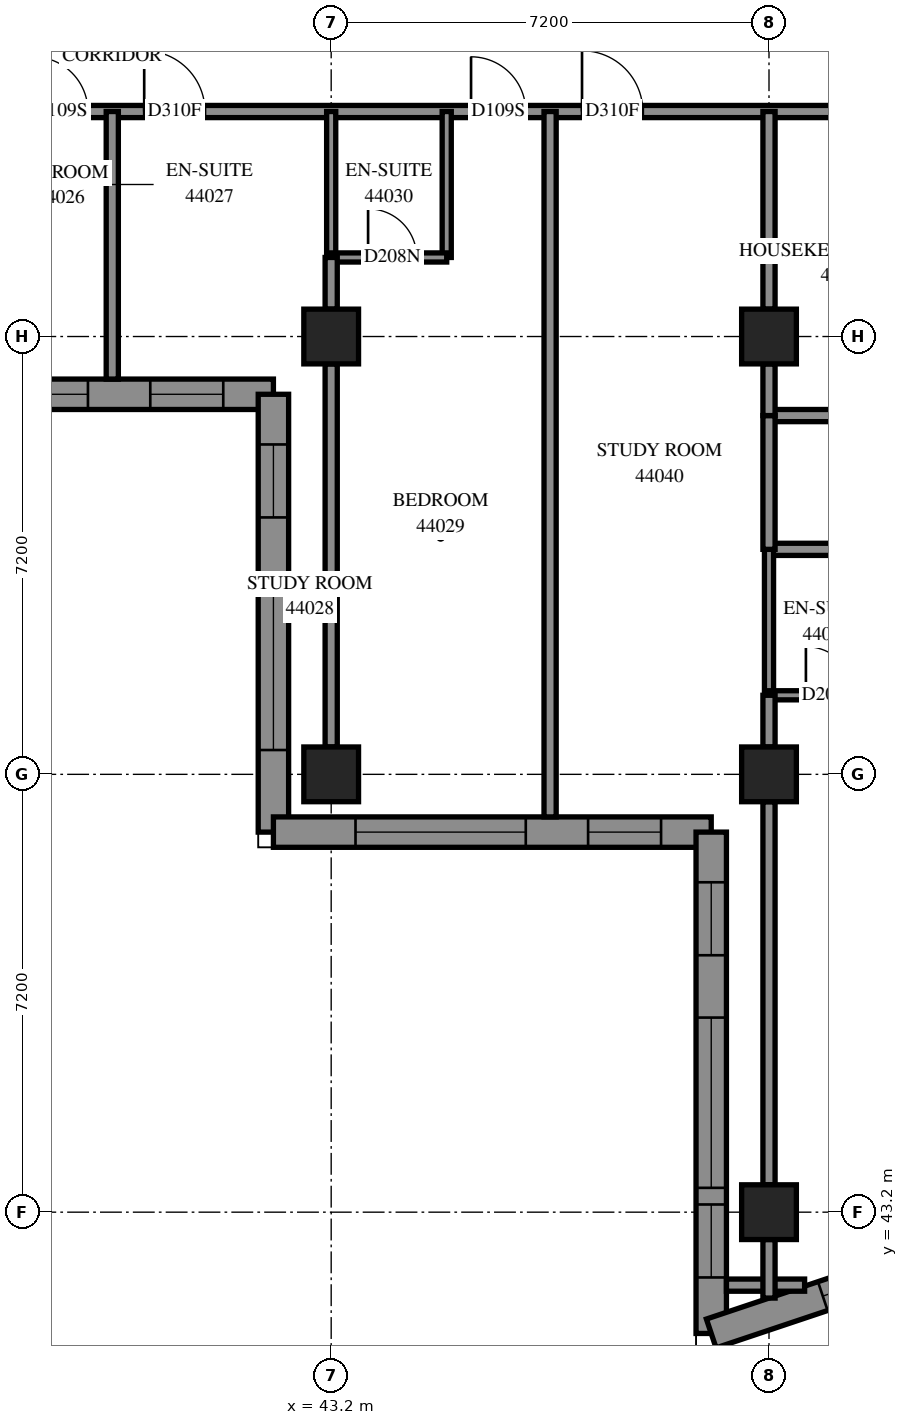
"""IFC4 building model, lengths in metres.
Left out: names, types, materials, properties, quantities, classifications, styles, units other than length and angle.
Written with IfcOpenShell. Run it as: python <this file> out.ifc"""

import sys

from ifc_helpers import new_model, si_unit, direction, frame, frame_2d, origin, origin_2d, place, context, subcontext, project, spatial, polyline, rectangle, outline, extrude, element, fill, save


model = new_model("IFC4")
c1 = context("Model", 3, precision=1e-05, world=origin(), true_north=direction((0.0, 1.0)))
c2 = subcontext(c1, "Body", "Model", "MODEL_VIEW")
j1 = project(units=[si_unit("LENGTHUNIT", "METRE"), si_unit("PLANEANGLEUNIT", "RADIAN")], contexts=[c1])
p1 = place(None, origin())
s1 = spatial("IfcSite", under=j1, at=p1, CompositionType="ELEMENT")
p2 = place(p1, origin())
s2 = spatial("IfcBuilding", under=s1, at=p2, CompositionType="ELEMENT")
p3 = place(p2, frame((0.0, 0.0, 162.6)))
s3 = spatial("IfcBuildingStorey", under=s2, at=p3, CompositionType="ELEMENT", Elevation=162.6)
for number, where, z_axis, x_axis in (
    (1, (43.2, 50.4, 0.0), (0.0, 0.0, 1.0), (1.0, 0.0, 0.0)),
    (2, (43.2, 57.6, 0.0), (0.0, 0.0, 1.0), (1.0, 0.0, 0.0)),
    (3, (50.4, 43.2, 0.0), (0.0, 0.0, 1.0), (1.0, 0.0, 0.0)),
    (4, (50.4, 50.4, 0.0), (0.0, 0.0, 1.0), (1.0, 0.0, 0.0)),
    (5, (50.4, 57.6, 0.0), (0.0, 0.0, 1.0), (1.0, 0.0, 0.0)),
):
    element("IfcColumn", number, at=place(p3, frame(where, z_axis=z_axis, x_axis=x_axis)), inside=s3, PredefinedType="COLUMN", context=c2, shape_type="SweptSolid", body=[
        extrude(rectangle(XDim=0.9, YDim=0.9, at=origin_2d()), origin(), (0.0, 0.0, 1.0), 3.1),
    ])
p4 = place(p3, frame((35.05, 56.65, 0.0), z_axis=(0.0, 0.0, 1.0), x_axis=(1.0, 0.0, 0.0)))
e6 = element("IfcWall", 6, at=p4, inside=s3, PredefinedType="SOLIDWALL", context=c2, shape_type="SweptSolid", body=[
    extrude(outline(polyline([(-0.25, -0.25), (6.95, -0.25), (7.45, 0.25), (0.25, 0.25), (-0.25, -0.25)])), origin(), (0.0, 0.0, 1.0), 3.1),
])
p5 = place(p4, frame((1.35, 0.0, 0.45)))
e7 = element("IfcOpeningElement", 7, at=p5, cuts=e6, PredefinedType="OPENING", context=c2, shape_type="SweptSolid", body=[
    extrude(rectangle(XDim=2.8, YDim=2.5, at=frame_2d((1.4, 1.25))), frame((0.0, 0.26, 0.0), z_axis=(0.0, -1.0, 0.0), x_axis=(1.0, 0.0, 0.0)), (0.0, 0.0, 1.0), 0.52),
])
p6 = place(p4, frame((5.175, 0.0, 0.45)))
e8 = element("IfcOpeningElement", 8, at=p6, cuts=e6, PredefinedType="OPENING", context=c2, shape_type="SweptSolid", body=[
    extrude(rectangle(XDim=1.2, YDim=2.5, at=frame_2d((0.6, 1.25))), frame((0.0, 0.26, 0.0), z_axis=(0.0, -1.0, 0.0), x_axis=(1.0, 0.0, 0.0)), (0.0, 0.0, 1.0), 0.52),
])
p7 = place(p3, frame((42.25, 56.65, 0.0), z_axis=(0.0, 0.0, 1.0), x_axis=(0.0, -1.0, 0.0)))
e9 = element("IfcWall", 9, at=p7, inside=s3, PredefinedType="SOLIDWALL", context=c2, shape_type="SweptSolid", body=[
    extrude(outline(polyline([(0.25, -0.25), (7.45, -0.25), (6.95, 0.25), (-0.25, 0.25), (0.25, -0.25)])), origin(), (0.0, 0.0, 1.0), 3.1),
])
p8 = place(p7, frame((3.05, 0.0, 0.45)))
e10 = element("IfcOpeningElement", 10, at=p8, cuts=e9, PredefinedType="OPENING", context=c2, shape_type="SweptSolid", body=[
    extrude(rectangle(XDim=2.8, YDim=2.5, at=frame_2d((1.4, 1.25))), frame((0.0, 0.26, 0.0), z_axis=(0.0, -1.0, 0.0), x_axis=(1.0, 0.0, 0.0)), (0.0, 0.0, 1.0), 0.52),
])
p9 = place(p7, frame((0.825, 0.0, 0.45)))
e11 = element("IfcOpeningElement", 11, at=p9, cuts=e9, PredefinedType="OPENING", context=c2, shape_type="SweptSolid", body=[
    extrude(rectangle(XDim=1.2, YDim=2.5, at=frame_2d((0.6, 1.25))), frame((0.0, 0.26, 0.0), z_axis=(0.0, -1.0, 0.0), x_axis=(1.0, 0.0, 0.0)), (0.0, 0.0, 1.0), 0.52),
])
p10 = place(p3, frame((42.25, 49.45, 0.0), z_axis=(0.0, 0.0, 1.0), x_axis=(1.0, 0.0, 0.0)))
e12 = element("IfcWall", 12, at=p10, inside=s3, PredefinedType="SOLIDWALL", context=c2, shape_type="SweptSolid", body=[
    extrude(outline(polyline([(-0.25, -0.25), (6.95, -0.25), (7.45, 0.25), (0.25, 0.25), (-0.25, -0.25)])), origin(), (0.0, 0.0, 1.0), 3.1),
])
p11 = place(p10, frame((1.35, 0.0, 0.45)))
e13 = element("IfcOpeningElement", 13, at=p11, cuts=e12, PredefinedType="OPENING", context=c2, shape_type="SweptSolid", body=[
    extrude(rectangle(XDim=2.8, YDim=2.5, at=frame_2d((1.4, 1.25))), frame((0.0, 0.26, 0.0), z_axis=(0.0, -1.0, 0.0), x_axis=(1.0, 0.0, 0.0)), (0.0, 0.0, 1.0), 0.52),
])
p12 = place(p10, frame((5.175, 0.0, 0.45)))
e14 = element("IfcOpeningElement", 14, at=p12, cuts=e12, PredefinedType="OPENING", context=c2, shape_type="SweptSolid", body=[
    extrude(rectangle(XDim=1.2, YDim=2.5, at=frame_2d((0.6, 1.25))), frame((0.0, 0.26, 0.0), z_axis=(0.0, -1.0, 0.0), x_axis=(1.0, 0.0, 0.0)), (0.0, 0.0, 1.0), 0.52),
])
p13 = place(p3, frame((49.45, 49.45, 0.0), z_axis=(0.0, 0.0, 1.0), x_axis=(0.0, -1.0, 0.0)))
e15 = element("IfcWall", 15, at=p13, inside=s3, PredefinedType="SOLIDWALL", context=c2, shape_type="SweptSolid", body=[
    extrude(outline(polyline([(0.25, -0.25), (8.592, -0.25), (7.897, 0.25), (-0.25, 0.25), (0.25, -0.25)])), origin(), (0.0, 0.0, 1.0), 3.1),
])
p14 = place(p13, frame((3.05, 0.0, 0.45)))
e16 = element("IfcOpeningElement", 16, at=p14, cuts=e15, PredefinedType="OPENING", context=c2, shape_type="SweptSolid", body=[
    extrude(rectangle(XDim=2.8, YDim=2.5, at=frame_2d((1.4, 1.25))), frame((0.0, 0.26, 0.0), z_axis=(0.0, -1.0, 0.0), x_axis=(1.0, 0.0, 0.0)), (0.0, 0.0, 1.0), 0.52),
])
p15 = place(p13, frame((0.825, 0.0, 0.45)))
e17 = element("IfcOpeningElement", 17, at=p15, cuts=e15, PredefinedType="OPENING", context=c2, shape_type="SweptSolid", body=[
    extrude(rectangle(XDim=1.2, YDim=2.5, at=frame_2d((0.6, 1.25))), frame((0.0, 0.26, 0.0), z_axis=(0.0, -1.0, 0.0), x_axis=(1.0, 0.0, 0.0)), (0.0, 0.0, 1.0), 0.52),
])
p16 = place(p13, frame((6.124, 0.0, 0.45)))
e18 = element("IfcOpeningElement", 18, at=p16, cuts=e15, PredefinedType="OPENING", context=c2, shape_type="SweptSolid", body=[
    extrude(rectangle(XDim=1.2, YDim=2.5, at=frame_2d((0.6, 1.25))), frame((0.0, 0.26, 0.0), z_axis=(0.0, -1.0, 0.0), x_axis=(1.0, 0.0, 0.0)), (0.0, 0.0, 1.0), 0.52),
])
p17 = place(p3, frame((49.45, 41.205, 0.0), z_axis=(0.0, 0.0, 1.0), x_axis=(0.9482534743, 0.3175143279, 0.0)))
e19 = element("IfcWall", 19, at=p17, inside=s3, PredefinedType="SOLIDWALL", context=c2, shape_type="SweptSolid", body=[
    extrude(outline(polyline([(-0.347, -0.25), (3.249, -0.25), (3.372, 0.25), (0.347, 0.25), (-0.347, -0.25)])), origin(), (0.0, 0.0, 1.0), 3.1),
])
p18 = place(p17, frame((1.935, 0.0, 0.45)))
e20 = element("IfcOpeningElement", 20, at=p18, cuts=e19, PredefinedType="OPENING", context=c2, shape_type="SweptSolid", body=[
    extrude(rectangle(XDim=1.0, YDim=2.5, at=frame_2d((0.5, 1.25))), frame((0.0, 0.26, 0.0), z_axis=(0.0, -1.0, 0.0), x_axis=(1.0, 0.0, 0.0)), (0.0, 0.0, 1.0), 0.52),
])
p19 = place(p3, frame((36.0, 61.3, 0.0), z_axis=(0.0, 0.0, 1.0), x_axis=(1.0, 0.0, 0.0)))
e21 = element("IfcWall", 21, at=p19, inside=s3, PredefinedType="PARTITIONING", context=c2, shape_type="SweptSolid", body=[
    extrude(rectangle(XDim=16.9, YDim=0.2, at=frame_2d((8.45, 0.0))), origin(), (0.0, 0.0, 1.0), 3.1),
])
p20 = place(p19, frame((2.3, 0.0, 0.0)))
e22 = element("IfcOpeningElement", 22, at=p20, cuts=e21, PredefinedType="OPENING", context=c2, shape_type="SweptSolid", body=[
    extrude(rectangle(XDim=0.9, YDim=2.1, at=frame_2d((0.45, 1.05))), frame((0.0, 0.11, 0.0), z_axis=(0.0, -1.0, 0.0), x_axis=(1.0, 0.0, 0.0)), (0.0, 0.0, 1.0), 0.22),
])
p21 = place(p19, frame((4.125, 0.0, 0.0)))
e23 = element("IfcOpeningElement", 23, at=p21, cuts=e21, PredefinedType="OPENING", context=c2, shape_type="SweptSolid", body=[
    extrude(rectangle(XDim=1.0, YDim=2.1, at=frame_2d((0.5, 1.05))), frame((0.0, 0.11, 0.0), z_axis=(0.0, -1.0, 0.0), x_axis=(1.0, 0.0, 0.0)), (0.0, 0.0, 1.0), 0.22),
])
p22 = place(p19, frame((9.5, 0.0, 0.0)))
e24 = element("IfcOpeningElement", 24, at=p22, cuts=e21, PredefinedType="OPENING", context=c2, shape_type="SweptSolid", body=[
    extrude(rectangle(XDim=0.9, YDim=2.1, at=frame_2d((0.45, 1.05))), frame((0.0, 0.11, 0.0), z_axis=(0.0, -1.0, 0.0), x_axis=(1.0, 0.0, 0.0)), (0.0, 0.0, 1.0), 0.22),
])
p23 = place(p19, frame((11.325, 0.0, 0.0)))
e25 = element("IfcOpeningElement", 25, at=p23, cuts=e21, PredefinedType="OPENING", context=c2, shape_type="SweptSolid", body=[
    extrude(rectangle(XDim=1.0, YDim=2.1, at=frame_2d((0.5, 1.05))), frame((0.0, 0.11, 0.0), z_axis=(0.0, -1.0, 0.0), x_axis=(1.0, 0.0, 0.0)), (0.0, 0.0, 1.0), 0.22),
])
p24 = place(p19, frame((15.647, 0.0, 0.0)))
e26 = element("IfcOpeningElement", 26, at=p24, cuts=e21, PredefinedType="OPENING", context=c2, shape_type="SweptSolid", body=[
    extrude(rectangle(XDim=1.0, YDim=2.1, at=frame_2d((0.5, 1.05))), frame((0.0, 0.11, 0.0), z_axis=(0.0, -1.0, 0.0), x_axis=(1.0, 0.0, 0.0)), (0.0, 0.0, 1.0), 0.22),
])
p25 = place(p3, frame((46.8, 49.7, 0.0), z_axis=(0.0, 0.0, 1.0), x_axis=(0.0, 1.0, 0.0)))
e27 = element("IfcWall", 27, at=p25, inside=s3, PredefinedType="PARTITIONING", context=c2, shape_type="SweptSolid", body=[
    extrude(rectangle(XDim=11.6, YDim=0.2, at=frame_2d((5.8, 0.0))), origin(), (0.0, 0.0, 1.0), 3.1),
])
for number, where, z_axis, x_axis in (
    (28, (50.4, 43.65, 0.0), (0.0, 0.0, 1.0), (0.0, 1.0, 0.0)),
    (29, (43.2, 50.85, 0.0), (0.0, 0.0, 1.0), (0.0, 1.0, 0.0)),
):
    element("IfcWall", number, at=place(p3, frame(where, z_axis=z_axis, x_axis=x_axis)), inside=s3, PredefinedType="PARTITIONING", context=c2, shape_type="SweptSolid", body=[
        extrude(rectangle(XDim=6.3, YDim=0.2, at=frame_2d((3.15, 0.0))), origin(), (0.0, 0.0, 1.0), 2.6),
    ])
p26 = place(p3, frame((50.4, 54.1, 0.0), z_axis=(0.0, 0.0, 1.0), x_axis=(1.0, 0.0, 0.0)))
e30 = element("IfcWall", 30, at=p26, inside=s3, PredefinedType="PARTITIONING", context=c2, shape_type="SweptSolid", body=[
    extrude(rectangle(XDim=4.5, YDim=0.2, at=frame_2d((2.25, 0.0))), origin(), (0.0, 0.0, 1.0), 3.1),
])
p27 = place(p26, frame((2.3, 0.0, 0.0)))
e31 = element("IfcOpeningElement", 31, at=p27, cuts=e30, PredefinedType="OPENING", context=c2, shape_type="SweptSolid", body=[
    extrude(rectangle(XDim=0.9, YDim=2.1, at=frame_2d((0.45, 1.05))), frame((0.0, 0.11, 0.0), z_axis=(0.0, -1.0, 0.0), x_axis=(1.0, 0.0, 0.0)), (0.0, 0.0, 1.0), 0.22),
])
p28 = place(p3, frame((39.6, 56.9, 0.0), z_axis=(0.0, 0.0, 1.0), x_axis=(0.0, 1.0, 0.0)))
e32 = element("IfcWall", 32, at=p28, inside=s3, PredefinedType="PARTITIONING", context=c2, shape_type="SweptSolid", body=[
    extrude(rectangle(XDim=4.4, YDim=0.2, at=frame_2d((2.2, 0.0))), origin(), (0.0, 0.0, 1.0), 3.1),
])
p29 = place(p3, frame((50.4, 58.05, 0.0), z_axis=(0.0, 0.0, 1.0), x_axis=(0.0, 1.0, 0.0)))
e33 = element("IfcWall", 33, at=p29, inside=s3, PredefinedType="PARTITIONING", context=c2, shape_type="SweptSolid", body=[
    extrude(rectangle(XDim=3.25, YDim=0.2, at=frame_2d((1.625, 0.0))), origin(), (0.0, 0.0, 1.0), 3.1),
])
p30 = place(p3, frame((50.4, 56.3, 0.0), z_axis=(0.0, 0.0, 1.0), x_axis=(1.0, 0.0, 0.0)))
e34 = element("IfcWall", 34, at=p30, inside=s3, PredefinedType="PARTITIONING", context=c2, shape_type="SweptSolid", body=[
    extrude(rectangle(XDim=2.5, YDim=0.2, at=frame_2d((1.25, 0.0))), origin(), (0.0, 0.0, 1.0), 3.1),
])
for number, where, z_axis, x_axis in (
    (35, (45.1, 58.9, 0.0), (0.0, 0.0, 1.0), (0.0, 1.0, 0.0)),
    (36, (43.2, 58.9, 0.0), (0.0, 0.0, 1.0), (0.0, 1.0, 0.0)),
    (37, (50.4, 51.7, 0.0), (0.0, 0.0, 1.0), (0.0, 1.0, 0.0)),
):
    element("IfcWall", number, at=place(p3, frame(where, z_axis=z_axis, x_axis=x_axis)), inside=s3, PredefinedType="PARTITIONING", context=c2, shape_type="SweptSolid", body=[
        extrude(rectangle(XDim=2.4, YDim=0.15, at=frame_2d((1.2, 0.0))), origin(), (0.0, 0.0, 1.0), 3.1),
    ])
p31 = place(p3, frame((50.4, 54.1, 0.0), z_axis=(0.0, 0.0, 1.0), x_axis=(0.0, 1.0, 0.0)))
e38 = element("IfcWall", 38, at=p31, inside=s3, PredefinedType="PARTITIONING", context=c2, shape_type="SweptSolid", body=[
    extrude(rectangle(XDim=2.2, YDim=0.2, at=frame_2d((1.1, 0.0))), origin(), (0.0, 0.0, 1.0), 3.1),
])
p32 = place(p3, frame((43.2, 58.9, 0.0), z_axis=(0.0, 0.0, 1.0), x_axis=(1.0, 0.0, 0.0)))
e39 = element("IfcWall", 39, at=p32, inside=s3, PredefinedType="PARTITIONING", context=c2, shape_type="SweptSolid", body=[
    extrude(rectangle(XDim=1.9, YDim=0.15, at=frame_2d((0.95, 0.0))), origin(), (0.0, 0.0, 1.0), 3.1),
])
p33 = place(p32, frame((0.607, 0.0, 0.0)))
e40 = element("IfcOpeningElement", 40, at=p33, cuts=e39, PredefinedType="OPENING", context=c2, shape_type="SweptSolid", body=[
    extrude(rectangle(XDim=0.8, YDim=2.1, at=frame_2d((0.4, 1.05))), frame((0.0, 0.085, 0.0), z_axis=(0.0, -1.0, 0.0), x_axis=(1.0, 0.0, 0.0)), (0.0, 0.0, 1.0), 0.17),
])
p34 = place(p3, frame((50.4, 51.7, 0.0), z_axis=(0.0, 0.0, 1.0), x_axis=(1.0, 0.0, 0.0)))
e41 = element("IfcWall", 41, at=p34, inside=s3, PredefinedType="PARTITIONING", context=c2, shape_type="SweptSolid", body=[
    extrude(rectangle(XDim=1.9, YDim=0.15, at=frame_2d((0.95, 0.0))), origin(), (0.0, 0.0, 1.0), 3.1),
])
p35 = place(p34, frame((0.607, 0.0, 0.0)))
e42 = element("IfcOpeningElement", 42, at=p35, cuts=e41, PredefinedType="OPENING", context=c2, shape_type="SweptSolid", body=[
    extrude(rectangle(XDim=0.8, YDim=2.1, at=frame_2d((0.4, 1.05))), frame((0.0, 0.085, 0.0), z_axis=(0.0, -1.0, 0.0), x_axis=(1.0, 0.0, 0.0)), (0.0, 0.0, 1.0), 0.17),
])
p36 = place(p3, frame((49.7, 42.0, 0.0), z_axis=(0.0, 0.0, 1.0), x_axis=(1.0, 0.0, 0.0)))
e43 = element("IfcWall", 43, at=p36, inside=s3, PredefinedType="PARTITIONING", context=c2, shape_type="SweptSolid", body=[
    extrude(rectangle(XDim=1.286, YDim=0.2, at=frame_2d((0.643, 0.0))), origin(), (0.0, 0.0, 1.0), 3.1),
])
for number, where, z_axis, x_axis in (
    (44, (43.2, 58.05, 0.0), (0.0, 0.0, 1.0), (0.0, 1.0, 0.0)),
    (45, (50.4, 50.85, 0.0), (0.0, 0.0, 1.0), (0.0, 1.0, 0.0)),
    (46, (50.4, 56.3, 0.0), (0.0, 0.0, 1.0), (0.0, 1.0, 0.0)),
):
    element("IfcWall", number, at=place(p3, frame(where, z_axis=z_axis, x_axis=x_axis)), inside=s3, PredefinedType="PARTITIONING", context=c2, shape_type="SweptSolid", body=[
        extrude(rectangle(XDim=0.85, YDim=0.2, at=frame_2d((0.425, 0.0))), origin(), (0.0, 0.0, 1.0), 3.1),
    ])
p37 = place(p3, frame((50.4, 41.787, 0.0), z_axis=(0.0, 0.0, 1.0), x_axis=(0.0, 1.0, 0.0)))
e47 = element("IfcWall", 47, at=p37, inside=s3, PredefinedType="PARTITIONING", context=c2, shape_type="SweptSolid", body=[
    extrude(rectangle(XDim=0.963, YDim=0.2, at=frame_2d((0.481, 0.0))), origin(), (0.0, 0.0, 1.0), 3.1),
])
p38 = place(p5, origin())
e48 = element("IfcWindow", 48, at=p38, inside=s3, PartitioningType="SINGLE_PANEL", PredefinedType="WINDOW", context=c2, shape_type="SweptSolid", body=[
    extrude(rectangle(XDim=2.8, YDim=2.5, at=frame_2d((1.4, 1.25))), frame((0.0, 0.18, 0.0), z_axis=(0.0, -1.0, 0.0), x_axis=(1.0, 0.0, 0.0)), (0.0, 0.0, 1.0), 0.06),
])
fill(e7, e48)
p39 = place(p6, origin())
e49 = element("IfcWindow", 49, at=p39, inside=s3, PartitioningType="SINGLE_PANEL", PredefinedType="WINDOW", context=c2, shape_type="SweptSolid", body=[
    extrude(rectangle(XDim=1.2, YDim=2.5, at=frame_2d((0.6, 1.25))), frame((0.0, 0.18, 0.0), z_axis=(0.0, -1.0, 0.0), x_axis=(1.0, 0.0, 0.0)), (0.0, 0.0, 1.0), 0.06),
])
fill(e8, e49)
p40 = place(p8, origin())
e50 = element("IfcWindow", 50, at=p40, inside=s3, PartitioningType="SINGLE_PANEL", PredefinedType="WINDOW", context=c2, shape_type="SweptSolid", body=[
    extrude(rectangle(XDim=2.8, YDim=2.5, at=frame_2d((1.4, 1.25))), frame((0.0, 0.18, 0.0), z_axis=(0.0, -1.0, 0.0), x_axis=(1.0, 0.0, 0.0)), (0.0, 0.0, 1.0), 0.06),
])
fill(e10, e50)
p41 = place(p9, origin())
e51 = element("IfcWindow", 51, at=p41, inside=s3, PartitioningType="SINGLE_PANEL", PredefinedType="WINDOW", context=c2, shape_type="SweptSolid", body=[
    extrude(rectangle(XDim=1.2, YDim=2.5, at=frame_2d((0.6, 1.25))), frame((0.0, 0.18, 0.0), z_axis=(0.0, -1.0, 0.0), x_axis=(1.0, 0.0, 0.0)), (0.0, 0.0, 1.0), 0.06),
])
fill(e11, e51)
p42 = place(p11, origin())
e52 = element("IfcWindow", 52, at=p42, inside=s3, PartitioningType="SINGLE_PANEL", PredefinedType="WINDOW", context=c2, shape_type="SweptSolid", body=[
    extrude(rectangle(XDim=2.8, YDim=2.5, at=frame_2d((1.4, 1.25))), frame((0.0, 0.18, 0.0), z_axis=(0.0, -1.0, 0.0), x_axis=(1.0, 0.0, 0.0)), (0.0, 0.0, 1.0), 0.06),
])
fill(e13, e52)
p43 = place(p12, origin())
e53 = element("IfcWindow", 53, at=p43, inside=s3, PartitioningType="SINGLE_PANEL", PredefinedType="WINDOW", context=c2, shape_type="SweptSolid", body=[
    extrude(rectangle(XDim=1.2, YDim=2.5, at=frame_2d((0.6, 1.25))), frame((0.0, 0.18, 0.0), z_axis=(0.0, -1.0, 0.0), x_axis=(1.0, 0.0, 0.0)), (0.0, 0.0, 1.0), 0.06),
])
fill(e14, e53)
p44 = place(p14, origin())
e54 = element("IfcWindow", 54, at=p44, inside=s3, PartitioningType="SINGLE_PANEL", PredefinedType="WINDOW", context=c2, shape_type="SweptSolid", body=[
    extrude(rectangle(XDim=2.8, YDim=2.5, at=frame_2d((1.4, 1.25))), frame((0.0, 0.18, 0.0), z_axis=(0.0, -1.0, 0.0), x_axis=(1.0, 0.0, 0.0)), (0.0, 0.0, 1.0), 0.06),
])
fill(e16, e54)
p45 = place(p15, origin())
e55 = element("IfcWindow", 55, at=p45, inside=s3, PartitioningType="SINGLE_PANEL", PredefinedType="WINDOW", context=c2, shape_type="SweptSolid", body=[
    extrude(rectangle(XDim=1.2, YDim=2.5, at=frame_2d((0.6, 1.25))), frame((0.0, 0.18, 0.0), z_axis=(0.0, -1.0, 0.0), x_axis=(1.0, 0.0, 0.0)), (0.0, 0.0, 1.0), 0.06),
])
fill(e17, e55)
p46 = place(p16, origin())
e56 = element("IfcWindow", 56, at=p46, inside=s3, PartitioningType="SINGLE_PANEL", PredefinedType="WINDOW", context=c2, shape_type="SweptSolid", body=[
    extrude(rectangle(XDim=1.2, YDim=2.5, at=frame_2d((0.6, 1.25))), frame((0.0, 0.18, 0.0), z_axis=(0.0, -1.0, 0.0), x_axis=(1.0, 0.0, 0.0)), (0.0, 0.0, 1.0), 0.06),
])
fill(e18, e56)
p47 = place(p20, origin())
e57 = element("IfcDoor", 57, at=p47, inside=s3, OperationType="SINGLE_SWING_LEFT", PredefinedType="DOOR", context=c2, shape_type="SweptSolid", body=[
    extrude(rectangle(XDim=0.9, YDim=2.1, at=frame_2d((0.45, 1.05))), frame((0.0, 0.025, 0.0), z_axis=(0.0, -1.0, 0.0), x_axis=(1.0, 0.0, 0.0)), (0.0, 0.0, 1.0), 0.05),
])
fill(e22, e57)
p48 = place(p21, origin())
e58 = element("IfcDoor", 58, at=p48, inside=s3, OperationType="SINGLE_SWING_RIGHT", PredefinedType="DOOR", context=c2, shape_type="SweptSolid", body=[
    extrude(rectangle(XDim=1.0, YDim=2.1, at=frame_2d((0.5, 1.05))), frame((0.0, 0.025, 0.0), z_axis=(0.0, -1.0, 0.0), x_axis=(1.0, 0.0, 0.0)), (0.0, 0.0, 1.0), 0.05),
])
fill(e23, e58)
p49 = place(p22, origin())
e59 = element("IfcDoor", 59, at=p49, inside=s3, OperationType="SINGLE_SWING_LEFT", PredefinedType="DOOR", context=c2, shape_type="SweptSolid", body=[
    extrude(rectangle(XDim=0.9, YDim=2.1, at=frame_2d((0.45, 1.05))), frame((0.0, 0.025, 0.0), z_axis=(0.0, -1.0, 0.0), x_axis=(1.0, 0.0, 0.0)), (0.0, 0.0, 1.0), 0.05),
])
fill(e24, e59)
p50 = place(p33, origin())
e60 = element("IfcDoor", 60, at=p50, inside=s3, OperationType="SINGLE_SWING_RIGHT", PredefinedType="DOOR", context=c2, shape_type="SweptSolid", body=[
    extrude(rectangle(XDim=0.8, YDim=2.1, at=frame_2d((0.4, 1.05))), frame((0.0, 0.025, 0.0), z_axis=(0.0, -1.0, 0.0), x_axis=(1.0, 0.0, 0.0)), (0.0, 0.0, 1.0), 0.05),
])
fill(e40, e60)
p51 = place(p23, origin())
e61 = element("IfcDoor", 61, at=p51, inside=s3, OperationType="SINGLE_SWING_RIGHT", PredefinedType="DOOR", context=c2, shape_type="SweptSolid", body=[
    extrude(rectangle(XDim=1.0, YDim=2.1, at=frame_2d((0.5, 1.05))), frame((0.0, 0.025, 0.0), z_axis=(0.0, -1.0, 0.0), x_axis=(1.0, 0.0, 0.0)), (0.0, 0.0, 1.0), 0.05),
])
fill(e25, e61)
p52 = place(p35, origin())
e62 = element("IfcDoor", 62, at=p52, inside=s3, OperationType="SINGLE_SWING_RIGHT", PredefinedType="DOOR", context=c2, shape_type="SweptSolid", body=[
    extrude(rectangle(XDim=0.8, YDim=2.1, at=frame_2d((0.4, 1.05))), frame((0.0, 0.025, 0.0), z_axis=(0.0, -1.0, 0.0), x_axis=(1.0, 0.0, 0.0)), (0.0, 0.0, 1.0), 0.05),
])
fill(e42, e62)
p53 = place(p18, origin())
e63 = element("IfcWindow", 63, at=p53, inside=s3, PartitioningType="SINGLE_PANEL", PredefinedType="WINDOW", context=c2, shape_type="SweptSolid", body=[
    extrude(rectangle(XDim=1.0, YDim=2.5, at=frame_2d((0.5, 1.25))), frame((0.0, 0.18, 0.0), z_axis=(0.0, -1.0, 0.0), x_axis=(1.0, 0.0, 0.0)), (0.0, 0.0, 1.0), 0.06),
])
fill(e20, e63)
save(model, sys.argv[1])
